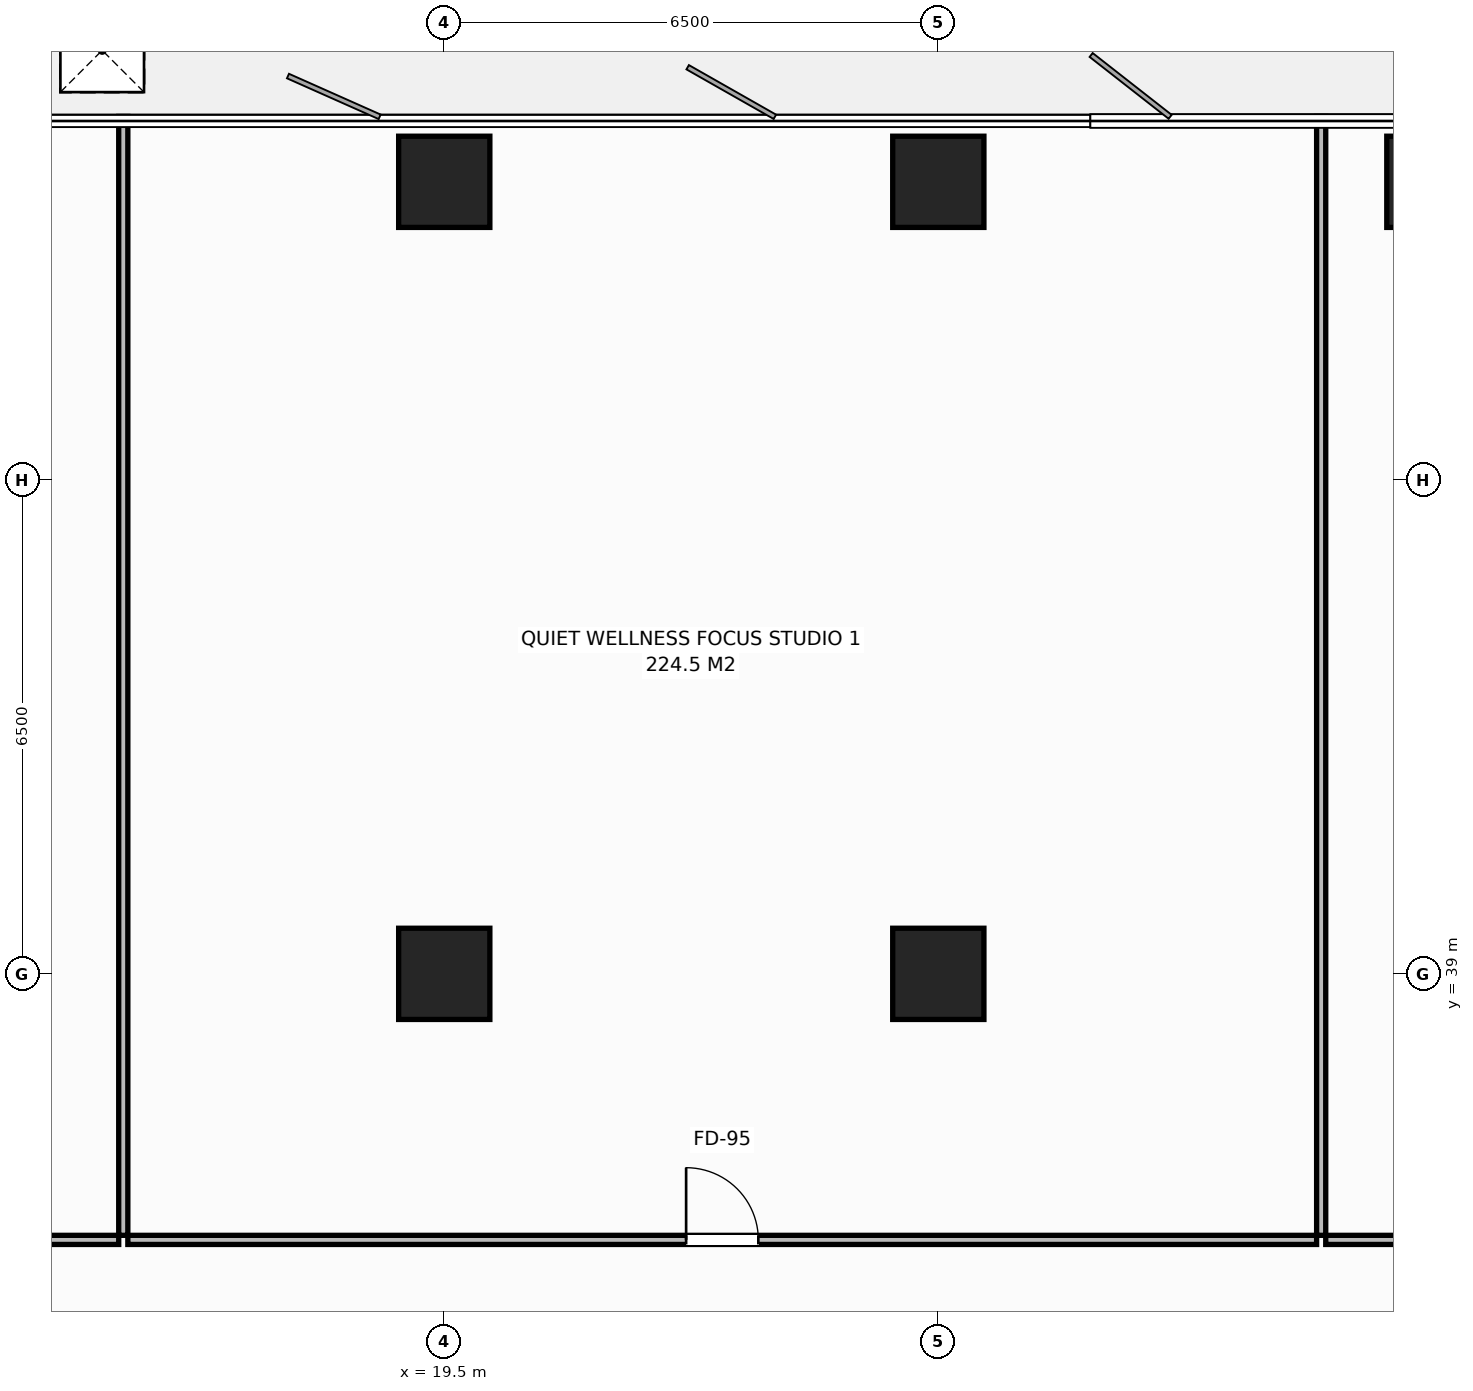
"""IFC4 building model, lengths in metres.
Left out: names, types, materials, properties, quantities, classifications, styles, units other than length and angle.
Written with IfcOpenShell. Run it as: python <this file> out.ifc"""

import sys

from ifc_helpers import new_model, si_unit, direction, frame, frame_2d, origin, origin_2d, place, context, subcontext, project, spatial, rectangle, extrude, element, fill, save


model = new_model("IFC4")
c1 = context("Model", 3, precision=1e-05, world=origin(), true_north=direction((0.0, 1.0)))
c2 = subcontext(c1, "Body", "Model", "MODEL_VIEW")
j1 = project(units=[si_unit("LENGTHUNIT", "METRE"), si_unit("PLANEANGLEUNIT", "RADIAN")], contexts=[c1])
p1 = place(None, origin())
s1 = spatial("IfcSite", under=j1, at=p1, CompositionType="ELEMENT")
p2 = place(p1, origin())
s2 = spatial("IfcBuilding", under=s1, at=p2, CompositionType="ELEMENT")
p3 = place(p2, frame((0.0, 0.0, 86.0)))
s3 = spatial("IfcBuildingStorey", under=s2, at=p3, CompositionType="ELEMENT", Elevation=86.0)
for number, where, z_axis, x_axis in (
    (1, (19.5, 39.0, 0.0), (0.0, 0.0, 1.0), (1.0, 0.0, 0.0)),
    (2, (26.0, 39.0, 0.0), (0.0, 0.0, 1.0), (1.0, 0.0, 0.0)),
    (3, (19.5, 49.42, 0.0), (0.0, 0.0, 1.0), (1.0, 0.0, 0.0)),
    (4, (26.0, 49.42, 0.0), (0.0, 0.0, 1.0), (1.0, 0.0, 0.0)),
    (5, (32.5, 49.42, 0.0), (0.0, 0.0, 1.0), (1.0, 0.0, 0.0)),
):
    element("IfcColumn", number, at=place(p3, frame(where, z_axis=z_axis, x_axis=x_axis)), inside=s3, PredefinedType="COLUMN", context=c2, shape_type="SweptSolid", body=[
        extrude(rectangle(XDim=1.2, YDim=1.2, at=origin_2d()), origin(), (0.0, 0.0, 1.0), 3.8),
    ])
p4 = place(p3, frame((15.277, 35.56, 0.0), z_axis=(0.0, 0.0, 1.0), x_axis=(0.0, 1.0, 0.0)))
e6 = element("IfcWall", 6, at=p4, inside=s3, PredefinedType="PARTITIONING", context=c2, shape_type="SweptSolid", body=[
    extrude(rectangle(XDim=14.72, YDim=0.12, at=frame_2d((7.36, 0.0))), origin(), (0.0, 0.0, 1.0), 3.565),
])
p5 = place(p3, frame((1.98, 35.5, 0.0), z_axis=(0.0, 0.0, 1.0), x_axis=(1.0, 0.0, 0.0)))
e7 = element("IfcWall", 7, at=p5, inside=s3, PredefinedType="PARTITIONING", context=c2, shape_type="SweptSolid", body=[
    extrude(rectangle(XDim=13.237, YDim=0.12, at=frame_2d((6.619, 0.0))), origin(), (0.0, 0.0, 1.0), 3.565),
])
p6 = place(p5, frame((8.9, 0.0, 0.0)))
e8 = element("IfcOpeningElement", 8, at=p6, cuts=e7, PredefinedType="OPENING", context=c2, shape_type="SweptSolid", body=[
    extrude(rectangle(XDim=0.95, YDim=2.15, at=frame_2d((0.475, 1.075))), frame((0.0, 0.07, 0.0), z_axis=(0.0, -1.0, 0.0), x_axis=(1.0, 0.0, 0.0)), (0.0, 0.0, 1.0), 0.14),
])
p7 = place(p3, frame((31.037, 35.56, 0.0), z_axis=(0.0, 0.0, 1.0), x_axis=(0.0, 1.0, 0.0)))
e9 = element("IfcWall", 9, at=p7, inside=s3, PredefinedType="PARTITIONING", context=c2, shape_type="SweptSolid", body=[
    extrude(rectangle(XDim=14.72, YDim=0.12, at=frame_2d((7.36, 0.0))), origin(), (0.0, 0.0, 1.0), 3.565),
])
p8 = place(p3, frame((15.337, 35.5, 0.0), z_axis=(0.0, 0.0, 1.0), x_axis=(1.0, 0.0, 0.0)))
e10 = element("IfcWall", 10, at=p8, inside=s3, PredefinedType="PARTITIONING", context=c2, shape_type="SweptSolid", body=[
    extrude(rectangle(XDim=15.64, YDim=0.12, at=frame_2d((7.82, 0.0))), origin(), (0.0, 0.0, 1.0), 3.565),
])
p9 = place(p8, frame((7.345, 0.0, 0.0)))
e11 = element("IfcOpeningElement", 11, at=p9, cuts=e10, PredefinedType="OPENING", context=c2, shape_type="SweptSolid", body=[
    extrude(rectangle(XDim=0.95, YDim=2.15, at=frame_2d((0.475, 1.075))), frame((0.0, 0.07, 0.0), z_axis=(0.0, -1.0, 0.0), x_axis=(1.0, 0.0, 0.0)), (0.0, 0.0, 1.0), 0.14),
])
p10 = place(p3, frame((31.097, 35.5, 0.0), z_axis=(0.0, 0.0, 1.0), x_axis=(1.0, 0.0, 0.0)))
e12 = element("IfcWall", 12, at=p10, inside=s3, PredefinedType="PARTITIONING", context=c2, shape_type="SweptSolid", body=[
    extrude(rectangle(XDim=11.043, YDim=0.12, at=frame_2d((5.521, 0.0))), origin(), (0.0, 0.0, 1.0), 3.565),
])
p11 = place(p10, frame((5.046, 0.0, 0.0)))
e13 = element("IfcOpeningElement", 13, at=p11, cuts=e12, PredefinedType="OPENING", context=c2, shape_type="SweptSolid", body=[
    extrude(rectangle(XDim=0.95, YDim=2.15, at=frame_2d((0.475, 1.075))), frame((0.0, 0.07, 0.0), z_axis=(0.0, -1.0, 0.0), x_axis=(1.0, 0.0, 0.0)), (0.0, 0.0, 1.0), 0.14),
])
p12 = place(p3, frame((0.0, 0.0, -0.21)))
p13 = place(p12, frame((15.0, 51.15, 0.0)))
p14 = place(p13, frame((0.0, 0.0, 0.21)))
e14 = element("IfcDoor", 14, at=p14, inside=s3, OperationType="SINGLE_SWING_LEFT", PredefinedType="TRAPDOOR", context=c2, shape_type="SweptSolid", body=[
    extrude(rectangle(XDim=1.1, YDim=1.1, at=origin_2d()), origin(), (0.0, 0.0, 1.0), 0.05),
])
p15 = place(p9, origin())
e15 = element("IfcDoor", 15, at=p15, inside=s3, OperationType="SINGLE_SWING_LEFT", PredefinedType="DOOR", context=c2, shape_type="SweptSolid", body=[
    extrude(rectangle(XDim=0.95, YDim=2.15, at=frame_2d((0.475, 1.075))), frame((0.0, 0.025, 0.0), z_axis=(0.0, -1.0, 0.0), x_axis=(1.0, 0.0, 0.0)), (0.0, 0.0, 1.0), 0.05),
])
fill(e11, e15)
save(model, sys.argv[1])
